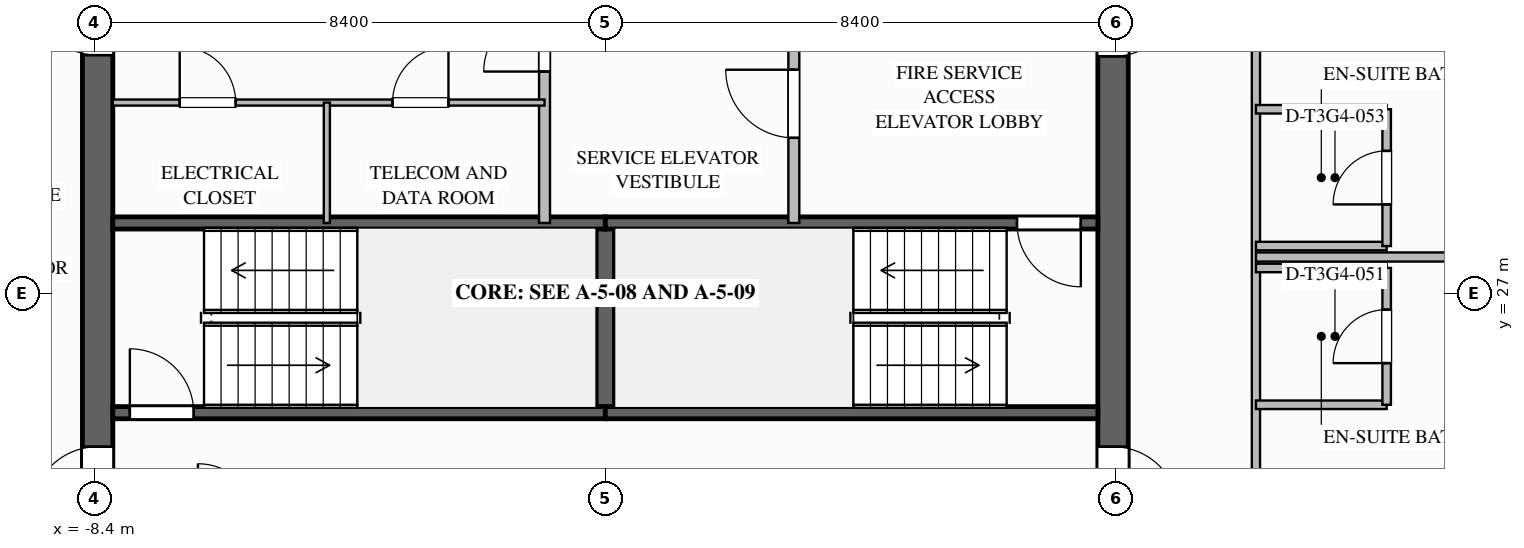
"""IFC4 building model, lengths in metres.
Left out: names, types, materials, properties, quantities, classifications, styles, units other than length and angle.
Written with IfcOpenShell. Run it as: python <this file> out.ifc"""

import sys

from ifc_helpers import new_model, si_unit, direction, frame, frame_2d, origin, place, context, subcontext, project, spatial, rectangle, extrude, element, fill, save


model = new_model("IFC4")
c1 = context("Model", 3, precision=1e-05, world=origin(), true_north=direction((0.0, 1.0)))
c2 = subcontext(c1, "Body", "Model", "MODEL_VIEW")
j1 = project(units=[si_unit("LENGTHUNIT", "METRE"), si_unit("PLANEANGLEUNIT", "RADIAN")], contexts=[c1])
p1 = place(None, origin())
s1 = spatial("IfcSite", under=j1, at=p1, CompositionType="ELEMENT")
p2 = place(p1, origin())
s2 = spatial("IfcBuilding", under=s1, at=p2, CompositionType="ELEMENT")
p3 = place(p2, frame((0.0, 0.0, 182.35)))
s3 = spatial("IfcBuildingStorey", under=s2, at=p3, CompositionType="ELEMENT", Elevation=182.35)
p4 = place(p3, frame((8.35, 35.1, 0.0), z_axis=(0.0, 0.0, 1.0), x_axis=(0.0, -1.0, 0.0)))
e1 = element("IfcWall", 1, at=p4, inside=s3, PredefinedType="SHEAR", context=c2, shape_type="SweptSolid", body=[
    extrude(rectangle(XDim=16.2, YDim=0.5, at=frame_2d((8.1, 0.0))), origin(), (0.0, 0.0, 1.0), 3.55),
])
p5 = place(p4, frame((3.08, 0.0, 0.0)))
e2 = element("IfcOpeningElement", 2, at=p5, cuts=e1, PredefinedType="OPENING", context=c2, shape_type="SweptSolid", body=[
    extrude(rectangle(XDim=1.12, YDim=2.1, at=frame_2d((0.56, 1.05))), frame((0.0, 0.26, 0.0), z_axis=(0.0, -1.0, 0.0), x_axis=(1.0, 0.0, 0.0)), (0.0, 0.0, 1.0), 0.52),
])
p6 = place(p4, frame((10.62, 0.0, 0.0)))
e3 = element("IfcOpeningElement", 3, at=p6, cuts=e1, PredefinedType="OPENING", context=c2, shape_type="SweptSolid", body=[
    extrude(rectangle(XDim=1.08, YDim=2.04, at=frame_2d((0.54, 1.02))), frame((0.0, 0.26, 0.0), z_axis=(0.0, -1.0, 0.0), x_axis=(1.0, 0.0, 0.0)), (0.0, 0.0, 1.0), 0.52),
])
p7 = place(p3, frame((-8.35, 18.9, 0.0), z_axis=(0.0, 0.0, 1.0), x_axis=(0.0, 1.0, 0.0)))
e4 = element("IfcWall", 4, at=p7, inside=s3, PredefinedType="SHEAR", context=c2, shape_type="SweptSolid", body=[
    extrude(rectangle(XDim=16.2, YDim=0.5, at=frame_2d((8.1, 0.0))), origin(), (0.0, 0.0, 1.0), 3.55),
])
p8 = place(p7, frame((12.02, 0.0, 0.0)))
e5 = element("IfcOpeningElement", 5, at=p8, cuts=e4, PredefinedType="OPENING", context=c2, shape_type="SweptSolid", body=[
    extrude(rectangle(XDim=1.08, YDim=2.04, at=frame_2d((0.54, 1.02))), frame((0.0, 0.26, 0.0), z_axis=(0.0, -1.0, 0.0), x_axis=(1.0, 0.0, 0.0)), (0.0, 0.0, 1.0), 0.52),
])
p9 = place(p7, frame((4.5, 0.0, 0.0)))
e6 = element("IfcOpeningElement", 6, at=p9, cuts=e4, PredefinedType="OPENING", context=c2, shape_type="SweptSolid", body=[
    extrude(rectangle(XDim=1.08, YDim=2.04, at=frame_2d((0.54, 1.02))), frame((0.0, 0.26, 0.0), z_axis=(0.0, -1.0, 0.0), x_axis=(1.0, 0.0, 0.0)), (0.0, 0.0, 1.0), 0.52),
])
p10 = place(p3, frame((0.0, 25.04, 0.0), z_axis=(0.0, 0.0, 1.0), x_axis=(0.0, 1.0, 0.0)))
e7 = element("IfcWall", 7, at=p10, inside=s3, PredefinedType="SOLIDWALL", context=c2, shape_type="SweptSolid", body=[
    extrude(rectangle(XDim=3.12, YDim=0.3, at=frame_2d((1.56, 0.0))), origin(), (0.0, 0.0, 1.0), 3.29),
])
p11 = place(p3, frame((-8.1, 25.04, 0.0), z_axis=(0.0, 0.0, 1.0), x_axis=(1.0, 0.0, 0.0)))
e8 = element("IfcWall", 8, at=p11, inside=s3, PredefinedType="SOLIDWALL", context=c2, shape_type="SweptSolid", body=[
    extrude(rectangle(XDim=8.1, YDim=0.2, at=frame_2d((4.05, 0.0))), origin(), (0.0, 0.0, 1.0), 3.29),
])
p12 = place(p11, frame((0.28, 0.0, 0.0)))
e9 = element("IfcOpeningElement", 9, at=p12, cuts=e8, PredefinedType="OPENING", context=c2, shape_type="SweptSolid", body=[
    extrude(rectangle(XDim=1.05, YDim=2.1, at=frame_2d((0.525, 1.05))), frame((0.0, 0.11, 0.0), z_axis=(0.0, -1.0, 0.0), x_axis=(1.0, 0.0, 0.0)), (0.0, 0.0, 1.0), 0.22),
])
for number, where, z_axis, x_axis in (
    (10, (-8.1, 28.16, 0.0), (0.0, 0.0, 1.0), (1.0, 0.0, 0.0)),
    (11, (0.0, 25.04, 0.0), (0.0, 0.0, 1.0), (1.0, 0.0, 0.0)),
):
    element("IfcWall", number, at=place(p3, frame(where, z_axis=z_axis, x_axis=x_axis)), inside=s3, PredefinedType="SOLIDWALL", context=c2, shape_type="SweptSolid", body=[
        extrude(rectangle(XDim=8.1, YDim=0.2, at=frame_2d((4.05, 0.0))), origin(), (0.0, 0.0, 1.0), 3.29),
    ])
p13 = place(p3, frame((8.1, 28.16, 0.0), z_axis=(0.0, 0.0, 1.0), x_axis=(-1.0, 0.0, 0.0)))
e12 = element("IfcWall", 12, at=p13, inside=s3, PredefinedType="SOLIDWALL", context=c2, shape_type="SweptSolid", body=[
    extrude(rectangle(XDim=8.1, YDim=0.2, at=frame_2d((4.05, 0.0))), origin(), (0.0, 0.0, 1.0), 3.29),
])
p14 = place(p13, frame((0.28, 0.0, 0.0)))
e13 = element("IfcOpeningElement", 13, at=p14, cuts=e12, PredefinedType="OPENING", context=c2, shape_type="SweptSolid", body=[
    extrude(rectangle(XDim=1.05, YDim=2.1, at=frame_2d((0.525, 1.05))), frame((0.0, 0.11, 0.0), z_axis=(0.0, -1.0, 0.0), x_axis=(1.0, 0.0, 0.0)), (0.0, 0.0, 1.0), 0.22),
])
p15 = place(p3, frame((3.1, 28.16, 0.0), z_axis=(0.0, 0.0, 1.0), x_axis=(0.0, 1.0, 0.0)))
e14 = element("IfcWall", 14, at=p15, inside=s3, PredefinedType="SOLIDWALL", context=c2, shape_type="SweptSolid", body=[
    extrude(rectangle(XDim=4.06, YDim=0.18, at=frame_2d((2.03, 0.0))), origin(), (0.0, 0.0, 1.0), 3.29),
])
p16 = place(p15, frame((1.4, 0.0, 0.0)))
e15 = element("IfcOpeningElement", 15, at=p16, cuts=e14, PredefinedType="OPENING", context=c2, shape_type="SweptSolid", body=[
    extrude(rectangle(XDim=1.12, YDim=2.1, at=frame_2d((0.56, 1.05))), frame((0.0, 0.1, 0.0), z_axis=(0.0, -1.0, 0.0), x_axis=(1.0, 0.0, 0.0)), (0.0, 0.0, 1.0), 0.2),
])
p17 = place(p3, frame((-1.0, 28.16, 0.0), z_axis=(0.0, 0.0, 1.0), x_axis=(0.0, 1.0, 0.0)))
e16 = element("IfcWall", 16, at=p17, inside=s3, PredefinedType="SOLIDWALL", context=c2, shape_type="SweptSolid", body=[
    extrude(rectangle(XDim=4.02, YDim=0.18, at=frame_2d((2.01, 0.0))), origin(), (0.0, 0.0, 1.0), 3.29),
])
p18 = place(p17, frame((2.49, 0.0, 0.0)))
e17 = element("IfcOpeningElement", 17, at=p18, cuts=e16, PredefinedType="OPENING", context=c2, shape_type="SweptSolid", body=[
    extrude(rectangle(XDim=1.0, YDim=2.1, at=frame_2d((0.5, 1.05))), frame((0.0, 0.1, 0.0), z_axis=(0.0, -1.0, 0.0), x_axis=(1.0, 0.0, 0.0)), (0.0, 0.0, 1.0), 0.2),
])
p19 = place(p3, frame((-8.1, 30.14, 0.0), z_axis=(0.0, 0.0, 1.0), x_axis=(1.0, 0.0, 0.0)))
e18 = element("IfcWall", 18, at=p19, inside=s3, PredefinedType="PARTITIONING", context=c2, shape_type="SweptSolid", body=[
    extrude(rectangle(XDim=7.1, YDim=0.1, at=frame_2d((3.55, 0.0))), origin(), (0.0, 0.0, 1.0), 3.29),
])
p20 = place(p19, frame((1.1, 0.0, 0.0)))
e19 = element("IfcOpeningElement", 19, at=p20, cuts=e18, PredefinedType="OPENING", context=c2, shape_type="SweptSolid", body=[
    extrude(rectangle(XDim=0.92, YDim=2.1, at=frame_2d((0.46, 1.05))), frame((0.0, 0.06, 0.0), z_axis=(0.0, -1.0, 0.0), x_axis=(1.0, 0.0, 0.0)), (0.0, 0.0, 1.0), 0.12),
])
p21 = place(p19, frame((4.6, 0.0, 0.0)))
e20 = element("IfcOpeningElement", 20, at=p21, cuts=e18, PredefinedType="OPENING", context=c2, shape_type="SweptSolid", body=[
    extrude(rectangle(XDim=0.92, YDim=2.1, at=frame_2d((0.46, 1.05))), frame((0.0, 0.06, 0.0), z_axis=(0.0, -1.0, 0.0), x_axis=(1.0, 0.0, 0.0)), (0.0, 0.0, 1.0), 0.12),
])
p22 = place(p3, frame((-4.58, 28.16, 0.0), z_axis=(0.0, 0.0, 1.0), x_axis=(0.0, 1.0, 0.0)))
e21 = element("IfcWall", 21, at=p22, inside=s3, PredefinedType="PARTITIONING", context=c2, shape_type="SweptSolid", body=[
    extrude(rectangle(XDim=1.98, YDim=0.1, at=frame_2d((0.99, 0.0))), origin(), (0.0, 0.0, 1.0), 3.29),
])
p23 = place(p3, frame((10.7, 10.8, 0.0), z_axis=(0.0, 0.0, 1.0), x_axis=(0.0, 1.0, 0.0)))
e22 = element("IfcWall", 22, at=p23, inside=s3, PredefinedType="PARTITIONING", context=c2, shape_type="SweptSolid", body=[
    extrude(rectangle(XDim=32.4, YDim=0.135, at=frame_2d((16.2, 0.0))), origin(), (0.0, 0.0, 1.0), 3.29),
])
p24 = place(p23, frame((5.685, 0.0, 0.0)))
e23 = element("IfcOpeningElement", 23, at=p24, cuts=e22, PredefinedType="OPENING", context=c2, shape_type="SweptSolid", body=[
    extrude(rectangle(XDim=1.26, YDim=2.2, at=frame_2d((0.63, 1.1))), frame((0.0, 0.077, 0.0), z_axis=(0.0, -1.0, 0.0), x_axis=(1.0, 0.0, 0.0)), (0.0, 0.0, 1.0), 0.155),
])
p25 = place(p23, frame((11.655, 0.0, 0.0)))
e24 = element("IfcOpeningElement", 24, at=p25, cuts=e22, PredefinedType="OPENING", context=c2, shape_type="SweptSolid", body=[
    extrude(rectangle(XDim=1.26, YDim=2.2, at=frame_2d((0.63, 1.1))), frame((0.0, 0.077, 0.0), z_axis=(0.0, -1.0, 0.0), x_axis=(1.0, 0.0, 0.0)), (0.0, 0.0, 1.0), 0.155),
])
p26 = place(p23, frame((21.885, 0.0, 0.0)))
e25 = element("IfcOpeningElement", 25, at=p26, cuts=e22, PredefinedType="OPENING", context=c2, shape_type="SweptSolid", body=[
    extrude(rectangle(XDim=1.26, YDim=2.2, at=frame_2d((0.63, 1.1))), frame((0.0, 0.077, 0.0), z_axis=(0.0, -1.0, 0.0), x_axis=(1.0, 0.0, 0.0)), (0.0, 0.0, 1.0), 0.155),
])
p27 = place(p23, frame((27.255, 0.0, 0.0)))
e26 = element("IfcOpeningElement", 26, at=p27, cuts=e22, PredefinedType="OPENING", context=c2, shape_type="SweptSolid", body=[
    extrude(rectangle(XDim=1.26, YDim=2.2, at=frame_2d((0.63, 1.1))), frame((0.0, 0.077, 0.0), z_axis=(0.0, -1.0, 0.0), x_axis=(1.0, 0.0, 0.0)), (0.0, 0.0, 1.0), 0.155),
])
for number, where, z_axis, x_axis in (
    (27, (10.7, 25.17, 0.0), (0.0, 0.0, 1.0), (1.0, 0.0, 0.0)),
    (28, (10.7, 27.42, 0.0), (0.0, 0.0, 1.0), (1.0, 0.0, 0.0)),
):
    element("IfcWall", number, at=place(p3, frame(where, z_axis=z_axis, x_axis=x_axis)), inside=s3, PredefinedType="PLUMBINGWALL", context=c2, shape_type="SweptSolid", body=[
        extrude(rectangle(XDim=2.15, YDim=0.14, at=frame_2d((1.075, 0.0))), origin(), (0.0, 0.0, 1.0), 3.29),
    ])
p28 = place(p3, frame((12.85, 25.17, 0.0), z_axis=(0.0, 0.0, 1.0), x_axis=(0.0, 1.0, 0.0)))
e29 = element("IfcWall", 29, at=p28, inside=s3, PredefinedType="PLUMBINGWALL", context=c2, shape_type="SweptSolid", body=[
    extrude(rectangle(XDim=2.25, YDim=0.14, at=frame_2d((1.125, 0.0))), origin(), (0.0, 0.0, 1.0), 3.29),
])
p29 = place(p28, frame((0.685, 0.0, 0.0)))
e30 = element("IfcOpeningElement", 30, at=p29, cuts=e29, PredefinedType="OPENING", context=c2, shape_type="SweptSolid", body=[
    extrude(rectangle(XDim=0.88, YDim=2.1, at=frame_2d((0.44, 1.05))), frame((0.0, 0.08, 0.0), z_axis=(0.0, -1.0, 0.0), x_axis=(1.0, 0.0, 0.0)), (0.0, 0.0, 1.0), 0.16),
])
p30 = place(p3, frame((10.7, 27.6, 0.0), z_axis=(0.0, 0.0, 1.0), x_axis=(1.0, 0.0, 0.0)))
e31 = element("IfcWall", 31, at=p30, inside=s3, PredefinedType="PARTITIONING", context=c2, shape_type="SweptSolid", body=[
    extrude(rectangle(XDim=10.7, YDim=0.15, at=frame_2d((5.35, 0.0))), origin(), (0.0, 0.0, 1.0), 3.29),
])
for number, where, z_axis, x_axis in (
    (32, (10.7, 27.78, 0.0), (0.0, 0.0, 1.0), (1.0, 0.0, 0.0)),
    (33, (10.7, 30.03, 0.0), (0.0, 0.0, 1.0), (1.0, 0.0, 0.0)),
):
    element("IfcWall", number, at=place(p3, frame(where, z_axis=z_axis, x_axis=x_axis)), inside=s3, PredefinedType="PLUMBINGWALL", context=c2, shape_type="SweptSolid", body=[
        extrude(rectangle(XDim=2.15, YDim=0.14, at=frame_2d((1.075, 0.0))), origin(), (0.0, 0.0, 1.0), 3.29),
    ])
p31 = place(p3, frame((12.85, 27.78, 0.0), z_axis=(0.0, 0.0, 1.0), x_axis=(0.0, 1.0, 0.0)))
e34 = element("IfcWall", 34, at=p31, inside=s3, PredefinedType="PLUMBINGWALL", context=c2, shape_type="SweptSolid", body=[
    extrude(rectangle(XDim=2.25, YDim=0.14, at=frame_2d((1.125, 0.0))), origin(), (0.0, 0.0, 1.0), 3.29),
])
p32 = place(p31, frame((0.685, 0.0, 0.0)))
e35 = element("IfcOpeningElement", 35, at=p32, cuts=e34, PredefinedType="OPENING", context=c2, shape_type="SweptSolid", body=[
    extrude(rectangle(XDim=0.88, YDim=2.1, at=frame_2d((0.44, 1.05))), frame((0.0, 0.08, 0.0), z_axis=(0.0, -1.0, 0.0), x_axis=(1.0, 0.0, 0.0)), (0.0, 0.0, 1.0), 0.16),
])
p33 = place(p12, origin())
e36 = element("IfcDoor", 36, at=p33, inside=s3, OperationType="SINGLE_SWING_LEFT", PredefinedType="DOOR", context=c2, shape_type="SweptSolid", body=[
    extrude(rectangle(XDim=1.05, YDim=2.1, at=frame_2d((0.525, 1.05))), frame((0.0, 0.025, 0.0), z_axis=(0.0, -1.0, 0.0), x_axis=(1.0, 0.0, 0.0)), (0.0, 0.0, 1.0), 0.05),
])
fill(e9, e36)
p34 = place(p14, origin())
e37 = element("IfcDoor", 37, at=p34, inside=s3, OperationType="SINGLE_SWING_LEFT", PredefinedType="DOOR", context=c2, shape_type="SweptSolid", body=[
    extrude(rectangle(XDim=1.05, YDim=2.1, at=frame_2d((0.525, 1.05))), frame((0.0, 0.025, 0.0), z_axis=(0.0, -1.0, 0.0), x_axis=(1.0, 0.0, 0.0)), (0.0, 0.0, 1.0), 0.05),
])
fill(e13, e37)
p35 = place(p16, origin())
e38 = element("IfcDoor", 38, at=p35, inside=s3, OperationType="SINGLE_SWING_RIGHT", PredefinedType="DOOR", context=c2, shape_type="SweptSolid", body=[
    extrude(rectangle(XDim=1.12, YDim=2.1, at=frame_2d((0.56, 1.05))), frame((0.0, 0.025, 0.0), z_axis=(0.0, -1.0, 0.0), x_axis=(1.0, 0.0, 0.0)), (0.0, 0.0, 1.0), 0.05),
])
fill(e15, e38)
p36 = place(p5, origin())
e39 = element("IfcDoor", 39, at=p36, inside=s3, OperationType="SINGLE_SWING_LEFT", PredefinedType="DOOR", context=c2, shape_type="SweptSolid", body=[
    extrude(rectangle(XDim=1.12, YDim=2.1, at=frame_2d((0.56, 1.05))), frame((0.0, 0.025, 0.0), z_axis=(0.0, -1.0, 0.0), x_axis=(1.0, 0.0, 0.0)), (0.0, 0.0, 1.0), 0.05),
])
fill(e2, e39)
p37 = place(p18, origin())
e40 = element("IfcDoor", 40, at=p37, inside=s3, OperationType="SINGLE_SWING_LEFT", PredefinedType="DOOR", context=c2, shape_type="SweptSolid", body=[
    extrude(rectangle(XDim=1.0, YDim=2.1, at=frame_2d((0.5, 1.05))), frame((0.0, 0.025, 0.0), z_axis=(0.0, -1.0, 0.0), x_axis=(1.0, 0.0, 0.0)), (0.0, 0.0, 1.0), 0.05),
])
fill(e17, e40)
p38 = place(p8, origin())
e41 = element("IfcDoor", 41, at=p38, inside=s3, OperationType="SINGLE_SWING_RIGHT", PredefinedType="DOOR", context=c2, shape_type="SweptSolid", body=[
    extrude(rectangle(XDim=1.08, YDim=2.04, at=frame_2d((0.54, 1.02))), frame((0.0, 0.025, 0.0), z_axis=(0.0, -1.0, 0.0), x_axis=(1.0, 0.0, 0.0)), (0.0, 0.0, 1.0), 0.05),
])
fill(e5, e41)
p39 = place(p20, origin())
e42 = element("IfcDoor", 42, at=p39, inside=s3, OperationType="SINGLE_SWING_LEFT", PredefinedType="DOOR", context=c2, shape_type="SweptSolid", body=[
    extrude(rectangle(XDim=0.92, YDim=2.1, at=frame_2d((0.46, 1.05))), frame((0.0, 0.025, 0.0), z_axis=(0.0, -1.0, 0.0), x_axis=(1.0, 0.0, 0.0)), (0.0, 0.0, 1.0), 0.05),
])
fill(e19, e42)
p40 = place(p21, origin())
e43 = element("IfcDoor", 43, at=p40, inside=s3, OperationType="SINGLE_SWING_RIGHT", PredefinedType="DOOR", context=c2, shape_type="SweptSolid", body=[
    extrude(rectangle(XDim=0.92, YDim=2.1, at=frame_2d((0.46, 1.05))), frame((0.0, 0.025, 0.0), z_axis=(0.0, -1.0, 0.0), x_axis=(1.0, 0.0, 0.0)), (0.0, 0.0, 1.0), 0.05),
])
fill(e20, e43)
p41 = place(p9, origin())
e44 = element("IfcDoor", 44, at=p41, inside=s3, OperationType="SINGLE_SWING_LEFT", PredefinedType="DOOR", context=c2, shape_type="SweptSolid", body=[
    extrude(rectangle(XDim=1.08, YDim=2.04, at=frame_2d((0.54, 1.02))), frame((0.0, 0.025, 0.0), z_axis=(0.0, -1.0, 0.0), x_axis=(1.0, 0.0, 0.0)), (0.0, 0.0, 1.0), 0.05),
])
fill(e6, e44)
p42 = place(p6, origin())
e45 = element("IfcDoor", 45, at=p42, inside=s3, OperationType="SINGLE_SWING_RIGHT", PredefinedType="DOOR", context=c2, shape_type="SweptSolid", body=[
    extrude(rectangle(XDim=1.08, YDim=2.04, at=frame_2d((0.54, 1.02))), frame((0.0, 0.025, 0.0), z_axis=(0.0, -1.0, 0.0), x_axis=(1.0, 0.0, 0.0)), (0.0, 0.0, 1.0), 0.05),
])
fill(e3, e45)
p43 = place(p29, origin())
e46 = element("IfcDoor", 46, at=p43, inside=s3, OperationType="SINGLE_SWING_LEFT", PredefinedType="DOOR", context=c2, shape_type="SweptSolid", body=[
    extrude(rectangle(XDim=0.88, YDim=2.1, at=frame_2d((0.44, 1.05))), frame((0.0, 0.025, 0.0), z_axis=(0.0, -1.0, 0.0), x_axis=(1.0, 0.0, 0.0)), (0.0, 0.0, 1.0), 0.05),
])
fill(e30, e46)
p44 = place(p32, origin())
e47 = element("IfcDoor", 47, at=p44, inside=s3, OperationType="SINGLE_SWING_LEFT", PredefinedType="DOOR", context=c2, shape_type="SweptSolid", body=[
    extrude(rectangle(XDim=0.88, YDim=2.1, at=frame_2d((0.44, 1.05))), frame((0.0, 0.025, 0.0), z_axis=(0.0, -1.0, 0.0), x_axis=(1.0, 0.0, 0.0)), (0.0, 0.0, 1.0), 0.05),
])
fill(e35, e47)
save(model, sys.argv[1])
